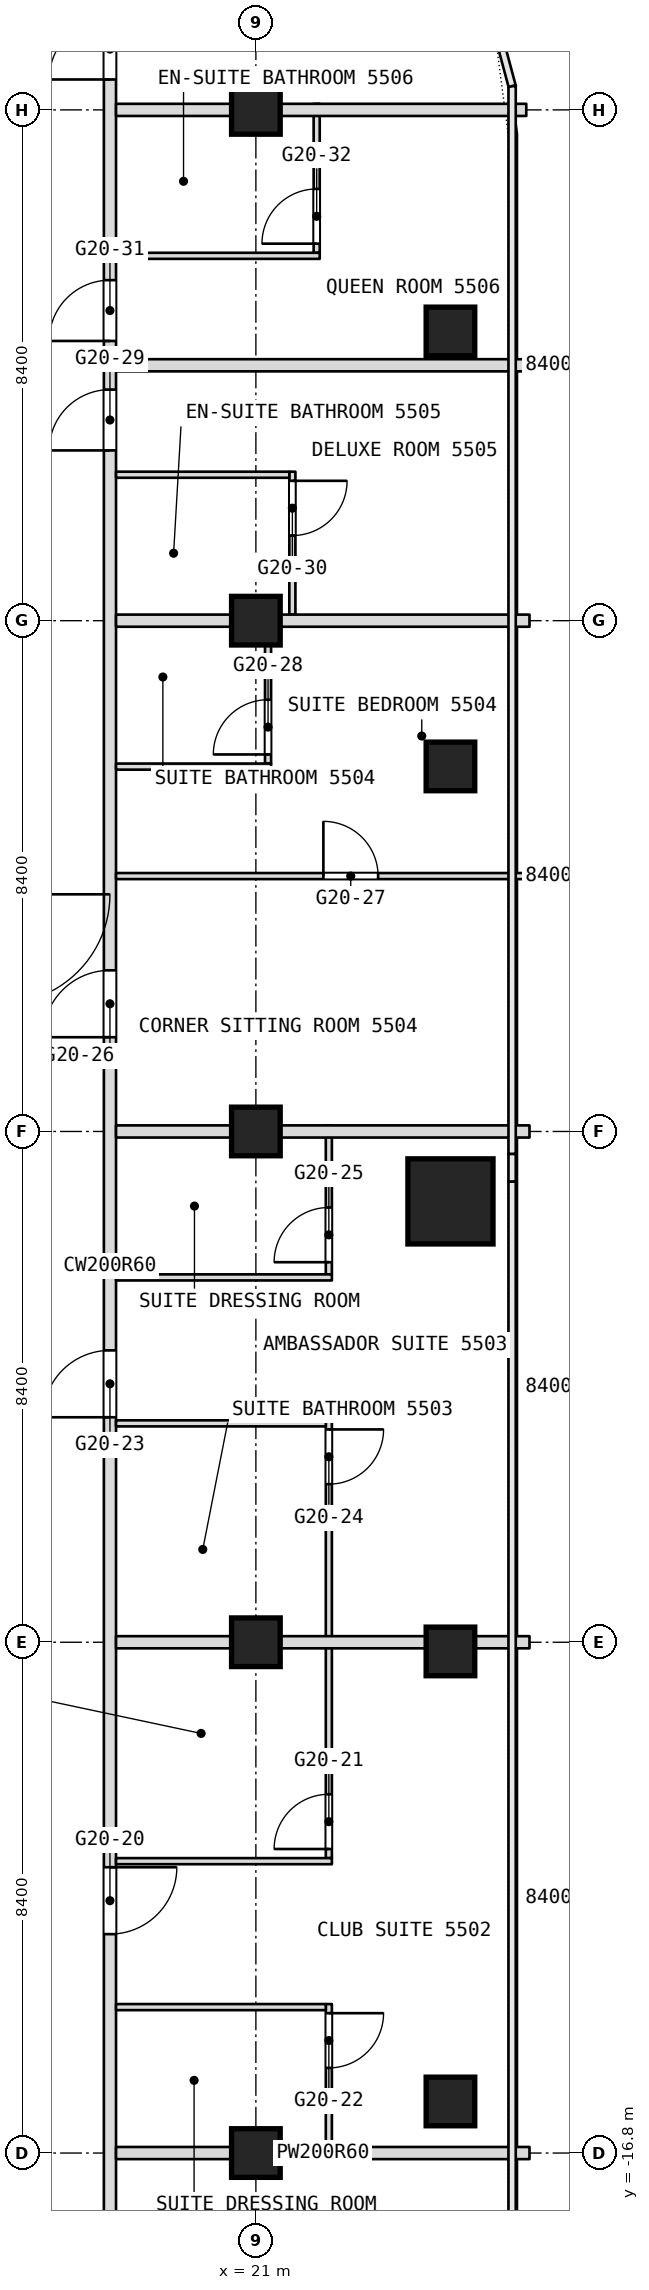
"""IFC4 building model, lengths in metres.
Left out: names, types, materials, properties, quantities, classifications, styles, units other than length and angle.
Written with IfcOpenShell. Run it as: python <this file> out.ifc"""

import sys

from ifc_helpers import new_model, si_unit, direction, frame, frame_2d, origin, origin_2d, place, context, subcontext, project, spatial, rectangle, extrude, element, fill, save


model = new_model("IFC4")
c1 = context("Model", 3, precision=1e-05, world=origin(), true_north=direction((0.0, 1.0)))
c2 = subcontext(c1, "Body", "Model", "MODEL_VIEW")
j1 = project(units=[si_unit("LENGTHUNIT", "METRE"), si_unit("PLANEANGLEUNIT", "RADIAN")], contexts=[c1])
p1 = place(None, origin())
s1 = spatial("IfcSite", under=j1, at=p1, CompositionType="ELEMENT")
p2 = place(p1, origin())
s2 = spatial("IfcBuilding", under=s1, at=p2, CompositionType="ELEMENT")
p3 = place(p2, frame((0.0, 0.0, 234.5)))
s3 = spatial("IfcBuildingStorey", under=s2, at=p3, CompositionType="ELEMENT", Elevation=234.5)
p4 = place(p3, frame((24.2, -1.15, 0.0), z_axis=(0.0, 0.0, 1.0), x_axis=(1.0, 0.0, 0.0)))
e1 = element("IfcColumn", 1, at=p4, inside=s3, PredefinedType="COLUMN", context=c2, shape_type="SweptSolid", body=[
    extrude(rectangle(XDim=1.4, YDim=1.4, at=origin_2d()), origin(), (0.0, 0.0, 1.0), 3.6),
])
for number, where, z_axis, x_axis in (
    (2, (21.0, -16.8, 0.0), (0.0, 0.0, 1.0), (1.0, 0.0, 0.0)),
    (3, (21.0, -8.4, 0.0), (0.0, 0.0, 1.0), (1.0, 0.0, 0.0)),
    (4, (21.0, 0.0, 0.0), (0.0, 0.0, 1.0), (1.0, 0.0, 0.0)),
    (5, (21.0, 8.4, 0.0), (0.0, 0.0, 1.0), (1.0, 0.0, 0.0)),
    (6, (21.0, 16.8, 0.0), (0.0, 0.0, 1.0), (1.0, 0.0, 0.0)),
    (7, (24.2, 13.156, 0.0), (0.0, 0.0, 1.0), (1.0, 0.0, 0.0)),
    (8, (24.2, 6.003, 0.0), (0.0, 0.0, 1.0), (1.0, 0.0, 0.0)),
    (9, (24.2, -8.551, 0.0), (0.0, 0.0, 1.0), (1.0, 0.0, 0.0)),
    (10, (24.2, -15.952, 0.0), (0.0, 0.0, 1.0), (1.0, 0.0, 0.0)),
):
    element("IfcColumn", number, at=place(p3, frame(where, z_axis=z_axis, x_axis=x_axis)), inside=s3, PredefinedType="COLUMN", context=c2, shape_type="SweptSolid", body=[
        extrude(rectangle(XDim=0.8, YDim=0.8, at=origin_2d()), origin(), (0.0, 0.0, 1.0), 3.6),
    ])
p5 = place(p3, frame((22.2, -16.7, 0.0), z_axis=(0.0, 0.0, 1.0), x_axis=(0.0, 1.0, 0.0)))
e11 = element("IfcWall", 11, at=p5, inside=s3, PredefinedType="PARTITIONING", context=c2, shape_type="SweptSolid", body=[
    extrude(rectangle(XDim=2.35, YDim=0.1, at=frame_2d((1.175, 0.0))), origin(), (0.0, 0.0, 1.0), 3.34),
])
p6 = place(p5, frame((1.3, 0.0, 0.0)))
e12 = element("IfcOpeningElement", 12, at=p6, cuts=e11, PredefinedType="OPENING", context=c2, shape_type="SweptSolid", body=[
    extrude(rectangle(XDim=0.9, YDim=2.1, at=frame_2d((0.45, 1.05))), frame((0.0, 0.05, 0.0), z_axis=(0.0, -1.0, 0.0), x_axis=(1.0, 0.0, 0.0)), (0.0, 0.0, 1.0), 0.1),
])
p7 = place(p3, frame((22.2, -11.95, 0.0), z_axis=(0.0, 0.0, 1.0), x_axis=(0.0, 1.0, 0.0)))
e13 = element("IfcWall", 13, at=p7, inside=s3, PredefinedType="PARTITIONING", context=c2, shape_type="SweptSolid", body=[
    extrude(rectangle(XDim=7.2, YDim=0.1, at=frame_2d((3.6, 0.0))), origin(), (0.0, 0.0, 1.0), 3.34),
])
p8 = place(p7, frame((0.15, 0.0, 0.0)))
e14 = element("IfcOpeningElement", 14, at=p8, cuts=e13, PredefinedType="OPENING", context=c2, shape_type="SweptSolid", body=[
    extrude(rectangle(XDim=0.9, YDim=2.1, at=frame_2d((0.45, 1.05))), frame((0.0, 0.05, 0.0), z_axis=(0.0, -1.0, 0.0), x_axis=(1.0, 0.0, 0.0)), (0.0, 0.0, 1.0), 0.1),
])
p9 = place(p7, frame((6.15, 0.0, 0.0)))
e15 = element("IfcOpeningElement", 15, at=p9, cuts=e13, PredefinedType="OPENING", context=c2, shape_type="SweptSolid", body=[
    extrude(rectangle(XDim=0.9, YDim=2.1, at=frame_2d((0.45, 1.05))), frame((0.0, 0.05, 0.0), z_axis=(0.0, -1.0, 0.0), x_axis=(1.0, 0.0, 0.0)), (0.0, 0.0, 1.0), 0.1),
])
p10 = place(p3, frame((22.2, -2.35, 0.0), z_axis=(0.0, 0.0, 1.0), x_axis=(0.0, 1.0, 0.0)))
e16 = element("IfcWall", 16, at=p10, inside=s3, PredefinedType="PARTITIONING", context=c2, shape_type="SweptSolid", body=[
    extrude(rectangle(XDim=2.45, YDim=0.1, at=frame_2d((1.225, 0.0))), origin(), (0.0, 0.0, 1.0), 3.34),
])
p11 = place(p10, frame((0.2, 0.0, 0.0)))
e17 = element("IfcOpeningElement", 17, at=p11, cuts=e16, PredefinedType="OPENING", context=c2, shape_type="SweptSolid", body=[
    extrude(rectangle(XDim=0.9, YDim=2.1, at=frame_2d((0.45, 1.05))), frame((0.0, 0.05, 0.0), z_axis=(0.0, -1.0, 0.0), x_axis=(1.0, 0.0, 0.0)), (0.0, 0.0, 1.0), 0.1),
])
p12 = place(p3, frame((22.0, 14.45, 0.0), z_axis=(0.0, 0.0, 1.0), x_axis=(0.0, 1.0, 0.0)))
e18 = element("IfcWall", 18, at=p12, inside=s3, PredefinedType="PARTITIONING", context=c2, shape_type="SweptSolid", body=[
    extrude(rectangle(XDim=2.45, YDim=0.1, at=frame_2d((1.225, 0.0))), origin(), (0.0, 0.0, 1.0), 3.34),
])
p13 = place(p12, frame((0.15, 0.0, 0.0)))
e19 = element("IfcOpeningElement", 19, at=p13, cuts=e18, PredefinedType="OPENING", context=c2, shape_type="SweptSolid", body=[
    extrude(rectangle(XDim=0.9, YDim=2.1, at=frame_2d((0.45, 1.05))), frame((0.0, 0.05, 0.0), z_axis=(0.0, -1.0, 0.0), x_axis=(1.0, 0.0, 0.0)), (0.0, 0.0, 1.0), 0.1),
])
p14 = place(p3, frame((21.6, 8.5, 0.0), z_axis=(0.0, 0.0, 1.0), x_axis=(0.0, 1.0, 0.0)))
e20 = element("IfcWall", 20, at=p14, inside=s3, PredefinedType="PARTITIONING", context=c2, shape_type="SweptSolid", body=[
    extrude(rectangle(XDim=2.35, YDim=0.1, at=frame_2d((1.175, 0.0))), origin(), (0.0, 0.0, 1.0), 3.34),
])
p15 = place(p14, frame((1.3, 0.0, 0.0)))
e21 = element("IfcOpeningElement", 21, at=p15, cuts=e20, PredefinedType="OPENING", context=c2, shape_type="SweptSolid", body=[
    extrude(rectangle(XDim=0.9, YDim=2.1, at=frame_2d((0.45, 1.05))), frame((0.0, 0.05, 0.0), z_axis=(0.0, -1.0, 0.0), x_axis=(1.0, 0.0, 0.0)), (0.0, 0.0, 1.0), 0.1),
])
p16 = place(p3, frame((21.2, 6.05, 0.0), z_axis=(0.0, 0.0, 1.0), x_axis=(0.0, 1.0, 0.0)))
e22 = element("IfcWall", 22, at=p16, inside=s3, PredefinedType="PARTITIONING", context=c2, shape_type="SweptSolid", body=[
    extrude(rectangle(XDim=2.45, YDim=0.1, at=frame_2d((1.225, 0.0))), origin(), (0.0, 0.0, 1.0), 3.34),
])
p17 = place(p16, frame((0.15, 0.0, 0.0)))
e23 = element("IfcOpeningElement", 23, at=p17, cuts=e22, PredefinedType="OPENING", context=c2, shape_type="SweptSolid", body=[
    extrude(rectangle(XDim=0.9, YDim=2.1, at=frame_2d((0.45, 1.05))), frame((0.0, 0.05, 0.0), z_axis=(0.0, -1.0, 0.0), x_axis=(1.0, 0.0, 0.0)), (0.0, 0.0, 1.0), 0.1),
])
p18 = place(p3, frame((18.6, -26.751, 0.0), z_axis=(0.0, 0.0, 1.0), x_axis=(0.0, 1.0, 0.0)))
e24 = element("IfcWall", 24, at=p18, inside=s3, PredefinedType="PARTITIONING", context=c2, shape_type="SweptSolid", body=[
    extrude(rectangle(XDim=49.091, YDim=0.2, at=frame_2d((24.545, 0.0))), origin(), (0.0, 0.0, 1.0), 3.34),
])
p19 = place(p18, frame((6.988, 0.0, 0.0)))
e25 = element("IfcOpeningElement", 25, at=p19, cuts=e24, PredefinedType="OPENING", context=c2, shape_type="SweptSolid", body=[
    extrude(rectangle(XDim=1.1, YDim=2.1, at=frame_2d((0.55, 1.05))), frame((0.0, 0.1, 0.0), z_axis=(0.0, -1.0, 0.0), x_axis=(1.0, 0.0, 0.0)), (0.0, 0.0, 1.0), 0.2),
])
p20 = place(p18, frame((13.551, 0.0, 0.0)))
e26 = element("IfcOpeningElement", 26, at=p20, cuts=e24, PredefinedType="OPENING", context=c2, shape_type="SweptSolid", body=[
    extrude(rectangle(XDim=1.1, YDim=2.1, at=frame_2d((0.55, 1.05))), frame((0.0, 0.1, 0.0), z_axis=(0.0, -1.0, 0.0), x_axis=(1.0, 0.0, 0.0)), (0.0, 0.0, 1.0), 0.2),
])
p21 = place(p18, frame((22.051, 0.0, 0.0)))
e27 = element("IfcOpeningElement", 27, at=p21, cuts=e24, PredefinedType="OPENING", context=c2, shape_type="SweptSolid", body=[
    extrude(rectangle(XDim=1.1, YDim=2.1, at=frame_2d((0.55, 1.05))), frame((0.0, 0.1, 0.0), z_axis=(0.0, -1.0, 0.0), x_axis=(1.0, 0.0, 0.0)), (0.0, 0.0, 1.0), 0.2),
])
p22 = place(p18, frame((28.301, 0.0, 0.0)))
e28 = element("IfcOpeningElement", 28, at=p22, cuts=e24, PredefinedType="OPENING", context=c2, shape_type="SweptSolid", body=[
    extrude(rectangle(XDim=1.1, YDim=2.1, at=frame_2d((0.55, 1.05))), frame((0.0, 0.1, 0.0), z_axis=(0.0, -1.0, 0.0), x_axis=(1.0, 0.0, 0.0)), (0.0, 0.0, 1.0), 0.2),
])
p23 = place(p18, frame((37.951, 0.0, 0.0)))
e29 = element("IfcOpeningElement", 29, at=p23, cuts=e24, PredefinedType="OPENING", context=c2, shape_type="SweptSolid", body=[
    extrude(rectangle(XDim=1.0, YDim=2.1, at=frame_2d((0.5, 1.05))), frame((0.0, 0.1, 0.0), z_axis=(0.0, -1.0, 0.0), x_axis=(1.0, 0.0, 0.0)), (0.0, 0.0, 1.0), 0.2),
])
p24 = place(p18, frame((39.751, 0.0, 0.0)))
e30 = element("IfcOpeningElement", 30, at=p24, cuts=e24, PredefinedType="OPENING", context=c2, shape_type="SweptSolid", body=[
    extrude(rectangle(XDim=1.0, YDim=2.1, at=frame_2d((0.5, 1.05))), frame((0.0, 0.1, 0.0), z_axis=(0.0, -1.0, 0.0), x_axis=(1.0, 0.0, 0.0)), (0.0, 0.0, 1.0), 0.2),
])
p25 = place(p18, frame((44.051, 0.0, 0.0)))
e31 = element("IfcOpeningElement", 31, at=p25, cuts=e24, PredefinedType="OPENING", context=c2, shape_type="SweptSolid", body=[
    extrude(rectangle(XDim=1.0, YDim=2.1, at=frame_2d((0.5, 1.05))), frame((0.0, 0.1, 0.0), z_axis=(0.0, -1.0, 0.0), x_axis=(1.0, 0.0, 0.0)), (0.0, 0.0, 1.0), 0.2),
])
p26 = place(p3, frame((18.7, -16.8, 0.0), z_axis=(0.0, 0.0, 1.0), x_axis=(1.0, 0.0, 0.0)))
e32 = element("IfcWall", 32, at=p26, inside=s3, PredefinedType="PARTITIONING", context=c2, shape_type="SweptSolid", body=[
    extrude(rectangle(XDim=6.8, YDim=0.2, at=frame_2d((3.4, 0.0))), origin(), (0.0, 0.0, 1.0), 2.94),
])
p27 = place(p3, frame((18.7, -14.4, 0.0), z_axis=(0.0, 0.0, 1.0), x_axis=(1.0, 0.0, 0.0)))
e33 = element("IfcWall", 33, at=p27, inside=s3, PredefinedType="PARTITIONING", context=c2, shape_type="SweptSolid", body=[
    extrude(rectangle(XDim=3.45, YDim=0.1, at=frame_2d((1.725, 0.0))), origin(), (0.0, 0.0, 1.0), 3.34),
])
p28 = place(p3, frame((18.7, -12.0, 0.0), z_axis=(0.0, 0.0, 1.0), x_axis=(1.0, 0.0, 0.0)))
e34 = element("IfcWall", 34, at=p28, inside=s3, PredefinedType="PARTITIONING", context=c2, shape_type="SweptSolid", body=[
    extrude(rectangle(XDim=3.55, YDim=0.1, at=frame_2d((1.775, 0.0))), origin(), (0.0, 0.0, 1.0), 3.34),
])
p29 = place(p3, frame((18.7, -8.4, 0.0), z_axis=(0.0, 0.0, 1.0), x_axis=(1.0, 0.0, 0.0)))
e35 = element("IfcWall", 35, at=p29, inside=s3, PredefinedType="PARTITIONING", context=c2, shape_type="SweptSolid", body=[
    extrude(rectangle(XDim=6.8, YDim=0.2, at=frame_2d((3.4, 0.0))), origin(), (0.0, 0.0, 1.0), 2.94),
])
p30 = place(p3, frame((18.7, -4.8, 0.0), z_axis=(0.0, 0.0, 1.0), x_axis=(1.0, 0.0, 0.0)))
e36 = element("IfcWall", 36, at=p30, inside=s3, PredefinedType="PARTITIONING", context=c2, shape_type="SweptSolid", body=[
    extrude(rectangle(XDim=3.45, YDim=0.1, at=frame_2d((1.725, 0.0))), origin(), (0.0, 0.0, 1.0), 3.34),
])
p31 = place(p3, frame((18.7, -2.4, 0.0), z_axis=(0.0, 0.0, 1.0), x_axis=(1.0, 0.0, 0.0)))
e37 = element("IfcWall", 37, at=p31, inside=s3, PredefinedType="PARTITIONING", context=c2, shape_type="SweptSolid", body=[
    extrude(rectangle(XDim=3.55, YDim=0.1, at=frame_2d((1.775, 0.0))), origin(), (0.0, 0.0, 1.0), 3.34),
])
p32 = place(p3, frame((18.7, 0.0, 0.0), z_axis=(0.0, 0.0, 1.0), x_axis=(1.0, 0.0, 0.0)))
e38 = element("IfcWall", 38, at=p32, inside=s3, PredefinedType="PARTITIONING", context=c2, shape_type="SweptSolid", body=[
    extrude(rectangle(XDim=6.8, YDim=0.2, at=frame_2d((3.4, 0.0))), origin(), (0.0, 0.0, 1.0), 2.94),
])
p33 = place(p3, frame((18.7, 4.2, 0.0), z_axis=(0.0, 0.0, 1.0), x_axis=(1.0, 0.0, 0.0)))
e39 = element("IfcWall", 39, at=p33, inside=s3, PredefinedType="PARTITIONING", context=c2, shape_type="SweptSolid", body=[
    extrude(rectangle(XDim=6.8, YDim=0.1, at=frame_2d((3.4, 0.0))), origin(), (0.0, 0.0, 1.0), 3.34),
])
p34 = place(p33, frame((3.41, 0.0, 0.0)))
e40 = element("IfcOpeningElement", 40, at=p34, cuts=e39, PredefinedType="OPENING", context=c2, shape_type="SweptSolid", body=[
    extrude(rectangle(XDim=0.9, YDim=2.1, at=frame_2d((0.45, 1.05))), frame((0.0, 0.05, 0.0), z_axis=(0.0, -1.0, 0.0), x_axis=(1.0, 0.0, 0.0)), (0.0, 0.0, 1.0), 0.1),
])
p35 = place(p3, frame((18.7, 6.0, 0.0), z_axis=(0.0, 0.0, 1.0), x_axis=(1.0, 0.0, 0.0)))
e41 = element("IfcWall", 41, at=p35, inside=s3, PredefinedType="PARTITIONING", context=c2, shape_type="SweptSolid", body=[
    extrude(rectangle(XDim=2.55, YDim=0.1, at=frame_2d((1.275, 0.0))), origin(), (0.0, 0.0, 1.0), 3.34),
])
p36 = place(p3, frame((18.7, 8.4, 0.0), z_axis=(0.0, 0.0, 1.0), x_axis=(1.0, 0.0, 0.0)))
e42 = element("IfcWall", 42, at=p36, inside=s3, PredefinedType="PARTITIONING", context=c2, shape_type="SweptSolid", body=[
    extrude(rectangle(XDim=6.8, YDim=0.2, at=frame_2d((3.4, 0.0))), origin(), (0.0, 0.0, 1.0), 2.94),
])
p37 = place(p3, frame((18.7, 10.8, 0.0), z_axis=(0.0, 0.0, 1.0), x_axis=(1.0, 0.0, 0.0)))
e43 = element("IfcWall", 43, at=p37, inside=s3, PredefinedType="PARTITIONING", context=c2, shape_type="SweptSolid", body=[
    extrude(rectangle(XDim=2.85, YDim=0.1, at=frame_2d((1.425, 0.0))), origin(), (0.0, 0.0, 1.0), 3.34),
])
p38 = place(p3, frame((18.7, 12.6, 0.0), z_axis=(0.0, 0.0, 1.0), x_axis=(1.0, 0.0, 0.0)))
e44 = element("IfcWall", 44, at=p38, inside=s3, PredefinedType="PARTITIONING", context=c2, shape_type="SweptSolid", body=[
    extrude(rectangle(XDim=6.8, YDim=0.2, at=frame_2d((3.4, 0.0))), origin(), (0.0, 0.0, 1.0), 3.34),
])
p39 = place(p3, frame((18.7, 14.4, 0.0), z_axis=(0.0, 0.0, 1.0), x_axis=(1.0, 0.0, 0.0)))
e45 = element("IfcWall", 45, at=p39, inside=s3, PredefinedType="PARTITIONING", context=c2, shape_type="SweptSolid", body=[
    extrude(rectangle(XDim=3.35, YDim=0.1, at=frame_2d((1.675, 0.0))), origin(), (0.0, 0.0, 1.0), 3.34),
])
p40 = place(p3, frame((18.7, 16.8, 0.0), z_axis=(0.0, 0.0, 1.0), x_axis=(1.0, 0.0, 0.0)))
e46 = element("IfcWall", 46, at=p40, inside=s3, PredefinedType="PARTITIONING", context=c2, shape_type="SweptSolid", body=[
    extrude(rectangle(XDim=6.747, YDim=0.2, at=frame_2d((3.374, 0.0))), origin(), (0.0, 0.0, 1.0), 2.94),
])
p41 = place(p6, origin())
e47 = element("IfcDoor", 47, at=p41, inside=s3, OperationType="SINGLE_SWING_RIGHT", PredefinedType="DOOR", context=c2, shape_type="SweptSolid", body=[
    extrude(rectangle(XDim=0.9, YDim=2.1, at=frame_2d((0.45, 1.05))), frame((0.0, 0.025, 0.0), z_axis=(0.0, -1.0, 0.0), x_axis=(1.0, 0.0, 0.0)), (0.0, 0.0, 1.0), 0.05),
])
fill(e12, e47)
p42 = place(p8, origin())
e48 = element("IfcDoor", 48, at=p42, inside=s3, OperationType="SINGLE_SWING_LEFT", PredefinedType="DOOR", context=c2, shape_type="SweptSolid", body=[
    extrude(rectangle(XDim=0.9, YDim=2.1, at=frame_2d((0.45, 1.05))), frame((0.0, 0.025, 0.0), z_axis=(0.0, -1.0, 0.0), x_axis=(1.0, 0.0, 0.0)), (0.0, 0.0, 1.0), 0.05),
])
fill(e14, e48)
p43 = place(p9, origin())
e49 = element("IfcDoor", 49, at=p43, inside=s3, OperationType="SINGLE_SWING_RIGHT", PredefinedType="DOOR", context=c2, shape_type="SweptSolid", body=[
    extrude(rectangle(XDim=0.9, YDim=2.1, at=frame_2d((0.45, 1.05))), frame((0.0, 0.025, 0.0), z_axis=(0.0, -1.0, 0.0), x_axis=(1.0, 0.0, 0.0)), (0.0, 0.0, 1.0), 0.05),
])
fill(e15, e49)
p44 = place(p11, origin())
e50 = element("IfcDoor", 50, at=p44, inside=s3, OperationType="SINGLE_SWING_LEFT", PredefinedType="DOOR", context=c2, shape_type="SweptSolid", body=[
    extrude(rectangle(XDim=0.9, YDim=2.1, at=frame_2d((0.45, 1.05))), frame((0.0, 0.025, 0.0), z_axis=(0.0, -1.0, 0.0), x_axis=(1.0, 0.0, 0.0)), (0.0, 0.0, 1.0), 0.05),
])
fill(e17, e50)
p45 = place(p13, origin())
e51 = element("IfcDoor", 51, at=p45, inside=s3, OperationType="SINGLE_SWING_LEFT", PredefinedType="DOOR", context=c2, shape_type="SweptSolid", body=[
    extrude(rectangle(XDim=0.9, YDim=2.1, at=frame_2d((0.45, 1.05))), frame((0.0, 0.025, 0.0), z_axis=(0.0, -1.0, 0.0), x_axis=(1.0, 0.0, 0.0)), (0.0, 0.0, 1.0), 0.05),
])
fill(e19, e51)
p46 = place(p15, origin())
e52 = element("IfcDoor", 52, at=p46, inside=s3, OperationType="SINGLE_SWING_RIGHT", PredefinedType="DOOR", context=c2, shape_type="SweptSolid", body=[
    extrude(rectangle(XDim=0.9, YDim=2.1, at=frame_2d((0.45, 1.05))), frame((0.0, 0.025, 0.0), z_axis=(0.0, -1.0, 0.0), x_axis=(1.0, 0.0, 0.0)), (0.0, 0.0, 1.0), 0.05),
])
fill(e21, e52)
p47 = place(p17, origin())
e53 = element("IfcDoor", 53, at=p47, inside=s3, OperationType="SINGLE_SWING_LEFT", PredefinedType="DOOR", context=c2, shape_type="SweptSolid", body=[
    extrude(rectangle(XDim=0.9, YDim=2.1, at=frame_2d((0.45, 1.05))), frame((0.0, 0.025, 0.0), z_axis=(0.0, -1.0, 0.0), x_axis=(1.0, 0.0, 0.0)), (0.0, 0.0, 1.0), 0.05),
])
fill(e23, e53)
p48 = place(p20, origin())
e54 = element("IfcDoor", 54, at=p48, inside=s3, OperationType="SINGLE_SWING_LEFT", PredefinedType="DOOR", context=c2, shape_type="SweptSolid", body=[
    extrude(rectangle(XDim=1.1, YDim=2.1, at=frame_2d((0.55, 1.05))), frame((0.0, 0.025, 0.0), z_axis=(0.0, -1.0, 0.0), x_axis=(1.0, 0.0, 0.0)), (0.0, 0.0, 1.0), 0.05),
])
fill(e26, e54)
p49 = place(p21, origin())
e55 = element("IfcDoor", 55, at=p49, inside=s3, OperationType="SINGLE_SWING_RIGHT", PredefinedType="DOOR", context=c2, shape_type="SweptSolid", body=[
    extrude(rectangle(XDim=1.1, YDim=2.1, at=frame_2d((0.55, 1.05))), frame((0.0, 0.025, 0.0), z_axis=(0.0, -1.0, 0.0), x_axis=(1.0, 0.0, 0.0)), (0.0, 0.0, 1.0), 0.05),
])
fill(e27, e55)
p50 = place(p22, origin())
e56 = element("IfcDoor", 56, at=p50, inside=s3, OperationType="SINGLE_SWING_RIGHT", PredefinedType="DOOR", context=c2, shape_type="SweptSolid", body=[
    extrude(rectangle(XDim=1.1, YDim=2.1, at=frame_2d((0.55, 1.05))), frame((0.0, 0.025, 0.0), z_axis=(0.0, -1.0, 0.0), x_axis=(1.0, 0.0, 0.0)), (0.0, 0.0, 1.0), 0.05),
])
fill(e28, e56)
p51 = place(p23, origin())
e57 = element("IfcDoor", 57, at=p51, inside=s3, OperationType="SINGLE_SWING_LEFT", PredefinedType="DOOR", context=c2, shape_type="SweptSolid", body=[
    extrude(rectangle(XDim=1.0, YDim=2.1, at=frame_2d((0.5, 1.05))), frame((0.0, 0.025, 0.0), z_axis=(0.0, -1.0, 0.0), x_axis=(1.0, 0.0, 0.0)), (0.0, 0.0, 1.0), 0.05),
])
fill(e29, e57)
p52 = place(p24, origin())
e58 = element("IfcDoor", 58, at=p52, inside=s3, OperationType="SINGLE_SWING_LEFT", PredefinedType="DOOR", context=c2, shape_type="SweptSolid", body=[
    extrude(rectangle(XDim=1.0, YDim=2.1, at=frame_2d((0.5, 1.05))), frame((0.0, 0.025, 0.0), z_axis=(0.0, -1.0, 0.0), x_axis=(1.0, 0.0, 0.0)), (0.0, 0.0, 1.0), 0.05),
])
fill(e30, e58)
p53 = place(p25, origin())
e59 = element("IfcDoor", 59, at=p53, inside=s3, OperationType="SINGLE_SWING_LEFT", PredefinedType="DOOR", context=c2, shape_type="SweptSolid", body=[
    extrude(rectangle(XDim=1.0, YDim=2.1, at=frame_2d((0.5, 1.05))), frame((0.0, 0.025, 0.0), z_axis=(0.0, -1.0, 0.0), x_axis=(1.0, 0.0, 0.0)), (0.0, 0.0, 1.0), 0.05),
])
fill(e31, e59)
p54 = place(p34, origin())
e60 = element("IfcDoor", 60, at=p54, inside=s3, OperationType="SINGLE_SWING_RIGHT", PredefinedType="DOOR", context=c2, shape_type="SweptSolid", body=[
    extrude(rectangle(XDim=0.9, YDim=2.1, at=frame_2d((0.45, 1.05))), frame((0.0, 0.025, 0.0), z_axis=(0.0, -1.0, 0.0), x_axis=(1.0, 0.0, 0.0)), (0.0, 0.0, 1.0), 0.05),
])
fill(e40, e60)
save(model, sys.argv[1])
